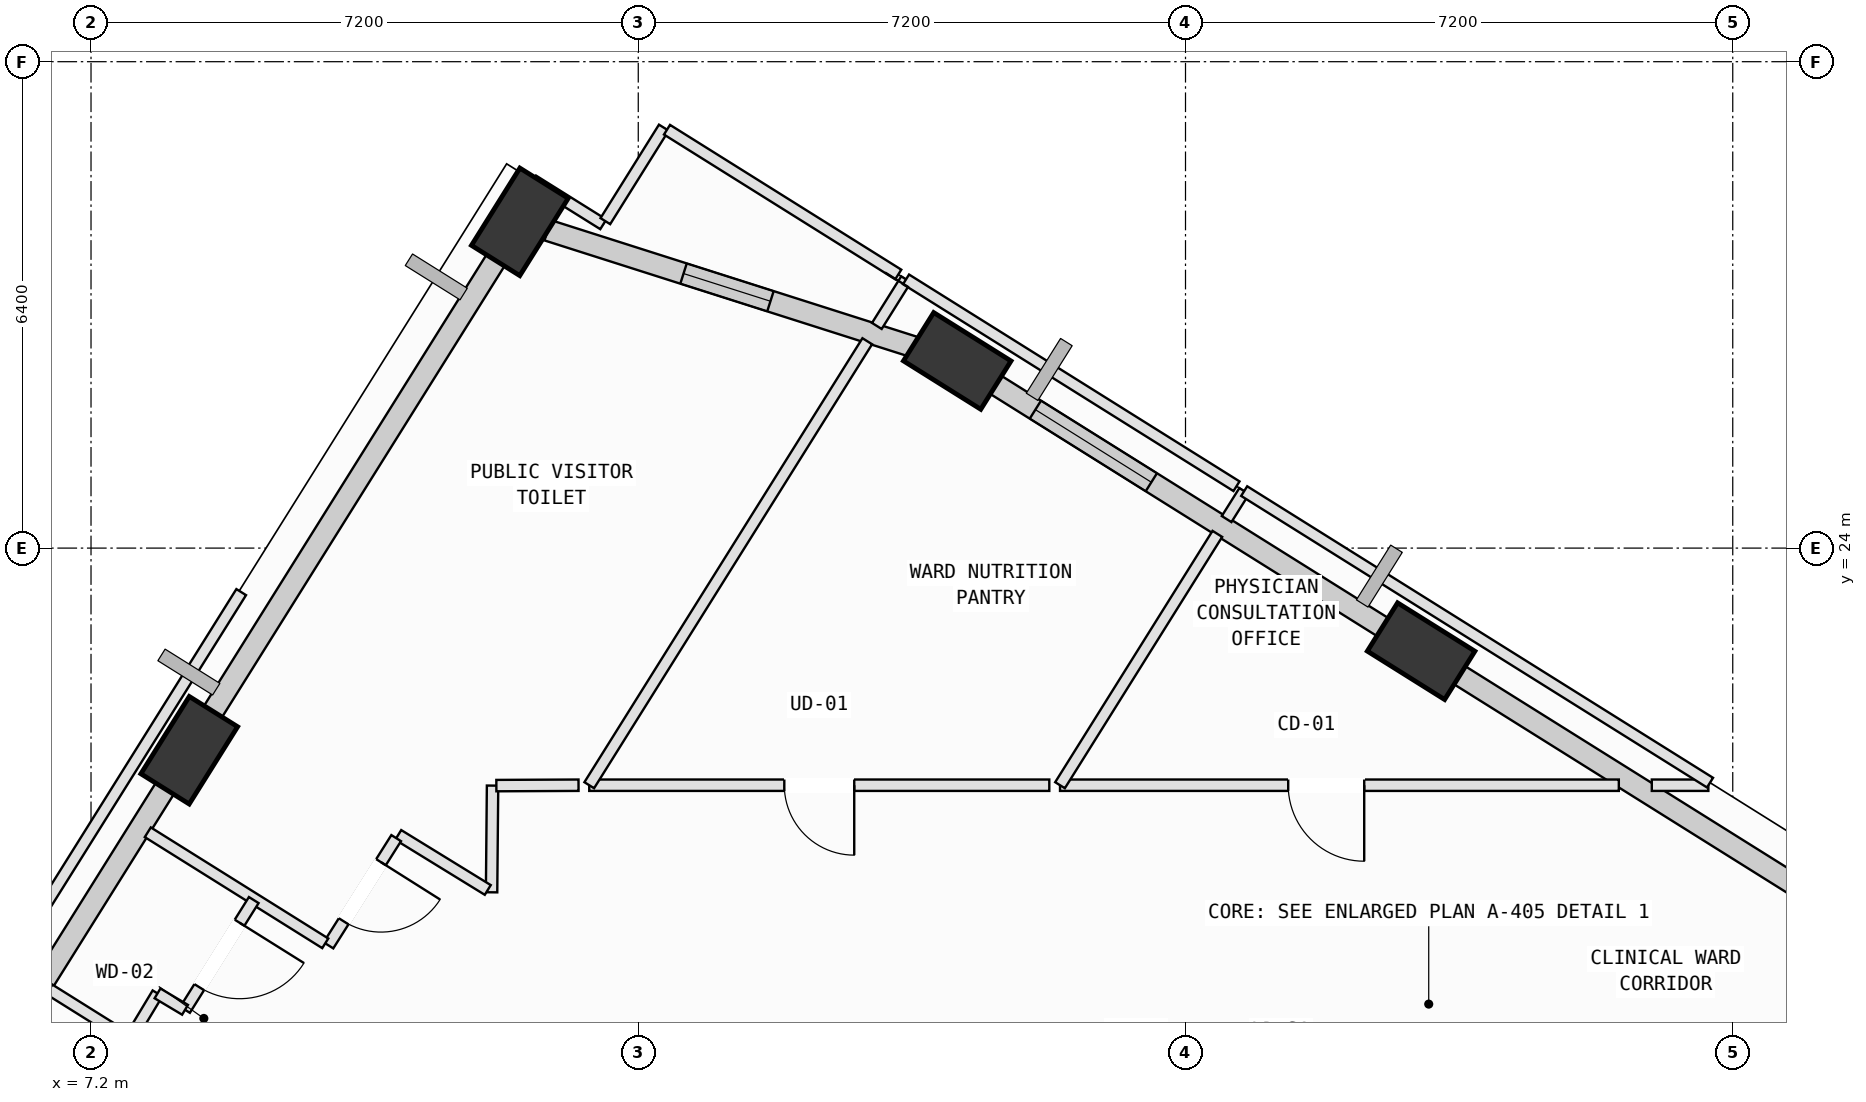
"""IFC4 building model, lengths in metres.
Left out: names, types, materials, properties, quantities, classifications, styles, units other than length and angle.
Written with IfcOpenShell. Run it as: python <this file> out.ifc"""

import sys

from ifc_helpers import new_model, si_unit, direction, frame, frame_2d, origin, origin_2d, place, context, subcontext, project, spatial, rectangle, extrude, element, fill, save


model = new_model("IFC4")
c1 = context("Model", 3, precision=1e-05, world=origin(), true_north=direction((0.0, 1.0)))
c2 = subcontext(c1, "Body", "Model", "MODEL_VIEW")
j1 = project(units=[si_unit("LENGTHUNIT", "METRE"), si_unit("PLANEANGLEUNIT", "RADIAN")], contexts=[c1])
p1 = place(None, origin())
s1 = spatial("IfcSite", under=j1, at=p1, CompositionType="ELEMENT")
p2 = place(p1, origin())
s2 = spatial("IfcBuilding", under=s1, at=p2, CompositionType="ELEMENT")
p3 = place(p2, frame((0.0, 0.0, 272.6)))
s3 = spatial("IfcBuildingStorey", under=s2, at=p3, CompositionType="ELEMENT", Elevation=272.6)
p4 = place(p3, frame((24.7, 22.644, 0.027), z_axis=(0.009214486038, -0.036796514246, 0.999280295906), x_axis=(-0.951010910613, 0.308501309069, 0.020129336738)))
e1 = element("IfcColumn", 1, at=p4, inside=s3, PredefinedType="COLUMN", context=c2, shape_type="SweptSolid", body=[
    extrude(rectangle(XDim=1.2, YDim=0.75, at=origin_2d()), origin(), (0.0, 0.0, 1.0), 3.974),
])
p5 = place(p3, frame((18.597, 26.463, 0.042), z_axis=(-0.006344430074, -0.062150776165, 0.998046606742), x_axis=(-0.789418350055, 0.612959701382, 0.0331522711)))
e2 = element("IfcColumn", 2, at=p5, inside=s3, PredefinedType="COLUMN", context=c2, shape_type="SweptSolid", body=[
    extrude(rectangle(XDim=1.2, YDim=0.75, at=origin_2d()), origin(), (0.0, 0.0, 1.0), 3.964),
])
p6 = place(p3, frame((12.842, 28.293, 0.064), z_axis=(-0.013724721487, -0.085810420826, 0.996216946101), x_axis=(0.657356075129, 0.749971848322, 0.073656073858)))
e3 = element("IfcColumn", 3, at=p6, inside=s3, PredefinedType="COLUMN", context=c2, shape_type="SweptSolid", body=[
    extrude(rectangle(XDim=1.2, YDim=0.75, at=origin_2d()), origin(), (0.0, 0.0, 1.0), 3.949),
])
p7 = place(p3, frame((8.492, 21.34, 0.076), z_axis=(0.015107029766, -0.103396474218, 0.994525488246), x_axis=(0.403217157116, 0.910808249086, 0.088567813586)))
e4 = element("IfcColumn", 4, at=p7, inside=s3, PredefinedType="COLUMN", context=c2, shape_type="SweptSolid", body=[
    extrude(rectangle(XDim=1.2, YDim=0.75, at=origin_2d()), origin(), (0.0, 0.0, 1.0), 3.943),
])
p8 = place(p3, frame((25.08, 22.406, 0.0), z_axis=(0.0, 0.0, 1.0), x_axis=(0.847580141129, -0.530667414077, 0.0)))
e5 = element("IfcWall", 5, at=p8, inside=s3, PredefinedType="SOLIDWALL", context=c2, shape_type="SweptSolid", body=[
    extrude(rectangle(XDim=6.958, YDim=0.28, at=frame_2d((3.479, 0.0))), origin(), (0.0, 0.0, 1.0), 2.765),
])
p9 = place(p3, frame((18.967, 26.234, 0.0), z_axis=(0.0, 0.0, 1.0), x_axis=(0.847594536736, -0.530644420771, 0.0)))
e6 = element("IfcWall", 6, at=p9, inside=s3, PredefinedType="SOLIDWALL", context=c2, shape_type="SweptSolid", body=[
    extrude(rectangle(XDim=6.424, YDim=0.28, at=frame_2d((3.212, 0.0))), origin(), (0.0, 0.0, 1.0), 3.265),
])
p10 = place(p9, frame((0.776, 0.0, 0.75)))
e7 = element("IfcOpeningElement", 7, at=p10, cuts=e6, PredefinedType="OPENING", context=c2, shape_type="SweptSolid", body=[
    extrude(rectangle(XDim=1.8, YDim=2.05, at=frame_2d((0.9, 1.025))), frame((0.0, 0.15, 0.0), z_axis=(0.0, -1.0, 0.0), x_axis=(1.0, 0.0, 0.0)), (0.0, 0.0, 1.0), 0.3),
])
p11 = place(p3, frame((13.209, 28.182, 0.0), z_axis=(0.0, 0.0, 1.0), x_axis=(0.952825347656, -0.303519121086, 0.0)))
e8 = element("IfcWall", 8, at=p11, inside=s3, PredefinedType="SOLIDWALL", context=c2, shape_type="SweptSolid", body=[
    extrude(rectangle(XDim=5.302, YDim=0.28, at=frame_2d((2.651, 0.0))), origin(), (0.0, 0.0, 1.0), 3.265),
])
p12 = place(p11, frame((1.875, 0.0, 0.75)))
e9 = element("IfcOpeningElement", 9, at=p12, cuts=e8, PredefinedType="OPENING", context=c2, shape_type="SweptSolid", body=[
    extrude(rectangle(XDim=1.2, YDim=1.75, at=frame_2d((0.6, 0.875))), frame((0.0, 0.15, 0.0), z_axis=(0.0, -1.0, 0.0), x_axis=(1.0, 0.0, 0.0)), (0.0, 0.0, 1.0), 0.3),
])
p13 = place(p3, frame((8.604, 21.529, 0.0), z_axis=(0.0, 0.0, 1.0), x_axis=(0.530668867354, 0.847579231235, 0.0)))
e10 = element("IfcWall", 10, at=p13, inside=s3, PredefinedType="SOLIDWALL", context=c2, shape_type="SweptSolid", body=[
    extrude(rectangle(XDim=7.434, YDim=0.28, at=frame_2d((3.717, 0.0))), origin(), (0.0, 0.0, 1.0), 3.265),
])
p14 = place(p3, frame((4.236, 14.552, 0.0), z_axis=(0.0, 0.0, 1.0), x_axis=(0.530664333184, 0.847582070059, 0.0)))
e11 = element("IfcWall", 11, at=p14, inside=s3, PredefinedType="SOLIDWALL", context=c2, shape_type="SweptSolid", body=[
    extrude(rectangle(XDim=7.485, YDim=0.28, at=frame_2d((3.742, 0.0))), origin(), (0.0, 0.0, 1.0), 3.265),
])
p15 = place(p3, frame((6.652, 18.193, 0.0), z_axis=(0.0, 0.0, 1.0), x_axis=(0.847575288096, -0.530675165246, 0.0)))
e12 = element("IfcWall", 12, at=p15, inside=s3, PredefinedType="PARTITIONING", context=c2, shape_type="SweptSolid", body=[
    extrude(rectangle(XDim=2.855, YDim=0.15, at=frame_2d((1.428, 0.0))), origin(), (0.0, 0.0, 1.0), 3.78),
])
p16 = place(p15, frame((1.275, 0.0, 0.0)))
e13 = element("IfcOpeningElement", 13, at=p16, cuts=e12, PredefinedType="OPENING", context=c2, shape_type="SweptSolid", body=[
    extrude(rectangle(XDim=1.3, YDim=2.15, at=frame_2d((0.65, 1.075))), frame((0.0, 0.085, 0.0), z_axis=(0.0, -1.0, 0.0), x_axis=(1.0, 0.0, 0.0)), (0.0, 0.0, 1.0), 0.17),
])
p17 = place(p3, frame((28.479, 20.88, 0.0), z_axis=(0.0, 0.0, 1.0), x_axis=(-1.0, 0.0, 0.0)))
e14 = element("IfcWall", 14, at=p17, inside=s3, PredefinedType="PARTITIONING", context=c2, shape_type="SweptSolid", body=[
    extrude(rectangle(XDim=0.744, YDim=0.15, at=frame_2d((0.372, 0.0))), origin(), (0.0, 0.0, 1.0), 3.78),
])
p18 = place(p3, frame((27.301, 20.88, 0.0), z_axis=(0.0, 0.0, 1.0), x_axis=(-1.0, 0.0, 0.0)))
e15 = element("IfcWall", 15, at=p18, inside=s3, PredefinedType="PARTITIONING", context=c2, shape_type="SweptSolid", body=[
    extrude(rectangle(XDim=7.352, YDim=0.15, at=frame_2d((3.676, 0.0))), origin(), (0.0, 0.0, 1.0), 3.415),
])
p19 = place(p18, frame((3.35, 0.0, 0.0)))
e16 = element("IfcOpeningElement", 16, at=p19, cuts=e15, PredefinedType="OPENING", context=c2, shape_type="SweptSolid", body=[
    extrude(rectangle(XDim=1.0, YDim=2.12, at=frame_2d((0.5, 1.06))), frame((0.0, 0.085, 0.0), z_axis=(0.0, -1.0, 0.0), x_axis=(1.0, 0.0, 0.0)), (0.0, 0.0, 1.0), 0.17),
])
p20 = place(p3, frame((19.949, 20.88, 0.0), z_axis=(0.0, 0.0, 1.0), x_axis=(0.530572539095, 0.847639534683, 0.0)))
e17 = element("IfcWall", 17, at=p20, inside=s3, PredefinedType="PARTITIONING", context=c2, shape_type="SweptSolid", body=[
    extrude(rectangle(XDim=3.902, YDim=0.15, at=frame_2d((1.951, 0.0))), origin(), (0.0, 0.0, 1.0), 3.78),
])
p21 = place(p3, frame((22.141, 24.382, 0.0), z_axis=(0.0, 0.0, 1.0), x_axis=(0.531665012804, 0.846954729699, 0.0)))
e18 = element("IfcWall", 18, at=p21, inside=s3, PredefinedType="PARTITIONING", context=c2, shape_type="SweptSolid", body=[
    extrude(rectangle(XDim=0.434, YDim=0.15, at=frame_2d((0.217, 0.0))), origin(), (0.0, 0.0, 1.0), 3.78),
])
p22 = place(p3, frame((22.372, 24.75, 0.0), z_axis=(0.0, 0.0, 1.0), x_axis=(0.847664268659, -0.530533022194, 0.0)))
e19 = element("IfcWall", 19, at=p22, inside=s3, PredefinedType="PARTITIONING", context=c2, shape_type="SweptSolid", body=[
    extrude(rectangle(XDim=7.23, YDim=0.15, at=frame_2d((3.615, 0.0))), origin(), (0.0, 0.0, 1.0), 3.78),
])
p23 = place(p3, frame((19.808, 20.88, 0.0), z_axis=(0.0, 0.0, 1.0), x_axis=(-1.0, 0.0, 0.0)))
e20 = element("IfcWall", 20, at=p23, inside=s3, PredefinedType="PARTITIONING", context=c2, shape_type="SweptSolid", body=[
    extrude(rectangle(XDim=6.053, YDim=0.15, at=frame_2d((3.027, 0.0))), origin(), (0.0, 0.0, 1.0), 3.415),
])
p24 = place(p23, frame((2.566, 0.0, 0.0)))
e21 = element("IfcOpeningElement", 21, at=p24, cuts=e20, PredefinedType="OPENING", context=c2, shape_type="SweptSolid", body=[
    extrude(rectangle(XDim=0.92, YDim=2.1, at=frame_2d((0.46, 1.05))), frame((0.0, 0.085, 0.0), z_axis=(0.0, -1.0, 0.0), x_axis=(1.0, 0.0, 0.0)), (0.0, 0.0, 1.0), 0.17),
])
p25 = place(p3, frame((13.755, 20.88, 0.0), z_axis=(0.0, 0.0, 1.0), x_axis=(0.530721458617, 0.847546301605, 0.0)))
e22 = element("IfcWall", 22, at=p25, inside=s3, PredefinedType="PARTITIONING", context=c2, shape_type="SweptSolid", body=[
    extrude(rectangle(XDim=6.893, YDim=0.15, at=frame_2d((3.446, 0.0))), origin(), (0.0, 0.0, 1.0), 3.78),
])
p26 = place(p3, frame((17.539, 26.923, 0.0), z_axis=(0.0, 0.0, 1.0), x_axis=(0.531030285818, 0.847352840052, 0.0)))
e23 = element("IfcWall", 23, at=p26, inside=s3, PredefinedType="PARTITIONING", context=c2, shape_type="SweptSolid", body=[
    extrude(rectangle(XDim=0.723, YDim=0.15, at=frame_2d((0.362, 0.0))), origin(), (0.0, 0.0, 1.0), 3.78),
])
p27 = place(p3, frame((17.923, 27.536, 0.0), z_axis=(0.0, 0.0, 1.0), x_axis=(0.847605017628, -0.530627679349, 0.0)))
e24 = element("IfcWall", 24, at=p27, inside=s3, PredefinedType="PARTITIONING", context=c2, shape_type="SweptSolid", body=[
    extrude(rectangle(XDim=5.13, YDim=0.15, at=frame_2d((2.565, 0.0))), origin(), (0.0, 0.0, 1.0), 3.78),
])
p28 = place(p3, frame((12.483, 20.875, 0.0), z_axis=(0.0, 0.0, 1.0), x_axis=(-0.009215397231, -0.999957537325, 0.0)))
e25 = element("IfcWall", 25, at=p28, inside=s3, PredefinedType="PARTITIONING", context=c2, shape_type="SweptSolid", body=[
    extrude(rectangle(XDim=1.404, YDim=0.15, at=frame_2d((0.702, 0.0))), origin(), (0.0, 0.0, 1.0), 3.78),
])
p29 = place(p3, frame((12.42, 19.502, 0.0), z_axis=(0.0, 0.0, 1.0), x_axis=(-0.851912829568, 0.523683617098, 0.0)))
e26 = element("IfcWall", 26, at=p29, inside=s3, PredefinedType="PARTITIONING", context=c2, shape_type="SweptSolid", body=[
    extrude(rectangle(XDim=1.383, YDim=0.15, at=frame_2d((0.691, 0.0))), origin(), (0.0, 0.0, 1.0), 3.78),
])
p30 = place(p3, frame((11.215, 20.184, 0.0), z_axis=(0.0, 0.0, 1.0), x_axis=(-0.533937952573, -0.845523661882, 0.0)))
e27 = element("IfcWall", 27, at=p30, inside=s3, PredefinedType="PARTITIONING", context=c2, shape_type="SweptSolid", body=[
    extrude(rectangle(XDim=1.669, YDim=0.15, at=frame_2d((0.834, 0.0))), origin(), (0.0, 0.0, 1.0), 3.78),
])
p31 = place(p30, frame((0.375, 0.0, 0.0)))
e28 = element("IfcOpeningElement", 28, at=p31, cuts=e27, PredefinedType="OPENING", context=c2, shape_type="SweptSolid", body=[
    extrude(rectangle(XDim=0.92, YDim=2.1, at=frame_2d((0.46, 1.05))), frame((0.0, 0.085, 0.0), z_axis=(0.0, -1.0, 0.0), x_axis=(1.0, 0.0, 0.0)), (0.0, 0.0, 1.0), 0.17),
])
p32 = place(p3, frame((10.282, 18.8, 0.0), z_axis=(0.0, 0.0, 1.0), x_axis=(-0.847739258665, 0.530413187354, 0.0)))
e29 = element("IfcWall", 29, at=p32, inside=s3, PredefinedType="PARTITIONING", context=c2, shape_type="SweptSolid", body=[
    extrude(rectangle(XDim=2.754, YDim=0.15, at=frame_2d((1.377, 0.0))), origin(), (0.0, 0.0, 1.0), 3.78),
])
p33 = place(p3, frame((8.047, 20.997, 0.0), z_axis=(0.0, 0.0, 1.0), x_axis=(0.531408304338, 0.847115820937, 0.0)))
e30 = element("IfcWall", 30, at=p33, inside=s3, PredefinedType="PARTITIONING", context=c2, shape_type="SweptSolid", body=[
    extrude(rectangle(XDim=0.747, YDim=0.15, at=frame_2d((0.374, 0.0))), origin(), (0.0, 0.0, 1.0), 3.78),
])
p34 = place(p3, frame((12.388, 27.931, 0.0), z_axis=(0.0, 0.0, 1.0), x_axis=(0.530755372275, 0.847525064409, 0.0)))
e31 = element("IfcWall", 31, at=p34, inside=s3, PredefinedType="PARTITIONING", context=c2, shape_type="SweptSolid", body=[
    extrude(rectangle(XDim=1.102, YDim=0.15, at=frame_2d((0.551, 0.0))), origin(), (0.0, 0.0, 1.0), 3.265),
])
p35 = place(p3, frame((13.015, 28.838, 0.0), z_axis=(0.0, 0.0, 1.0), x_axis=(0.848111459757, -0.529817847782, 0.0)))
e32 = element("IfcWall", 32, at=p35, inside=s3, PredefinedType="PARTITIONING", context=c2, shape_type="SweptSolid", body=[
    extrude(rectangle(XDim=1.091, YDim=0.15, at=frame_2d((0.545, 0.0))), origin(), (0.0, 0.0, 1.0), 3.78),
])
p36 = place(p3, frame((13.967, 28.302, 0.0), z_axis=(0.0, 0.0, 1.0), x_axis=(0.530150213956, 0.847903739019, 0.0)))
e33 = element("IfcWall", 33, at=p36, inside=s3, PredefinedType="PARTITIONING", context=c2, shape_type="SweptSolid", body=[
    extrude(rectangle(XDim=1.451, YDim=0.15, at=frame_2d((0.725, 0.0))), origin(), (0.0, 0.0, 1.0), 3.78),
])
p37 = place(p3, frame((14.778, 29.505, 0.0), z_axis=(0.0, 0.0, 1.0), x_axis=(0.847631325051, -0.530585654529, 0.0)))
e34 = element("IfcWall", 34, at=p37, inside=s3, PredefinedType="PARTITIONING", context=c2, shape_type="SweptSolid", body=[
    extrude(rectangle(XDim=3.59, YDim=0.15, at=frame_2d((1.795, 0.0))), origin(), (0.0, 0.0, 1.0), 3.78),
])
p38 = place(p3, frame((13.614, 20.88, 0.0), z_axis=(0.0, 0.0, 1.0), x_axis=(-0.999989799813, -0.004516665762, 0.0)))
e35 = element("IfcWall", 35, at=p38, inside=s3, PredefinedType="PARTITIONING", context=c2, shape_type="SweptSolid", body=[
    extrude(rectangle(XDim=1.081, YDim=0.15, at=frame_2d((0.541, 0.0))), origin(), (0.0, 0.0, 1.0), 3.78),
])
p39 = place(p3, frame((8.075, 18.141, 0.0), z_axis=(0.0, 0.0, 1.0), x_axis=(-0.515577678188, -0.85684284309, 0.0)))
e36 = element("IfcWall", 36, at=p39, inside=s3, PredefinedType="PARTITIONING", context=c2, shape_type="SweptSolid", body=[
    extrude(rectangle(XDim=0.63, YDim=0.15, at=frame_2d((0.315, 0.0))), origin(), (0.0, 0.0, 1.0), 3.78),
])
p40 = place(p3, frame((5.891, 18.174, 0.0), z_axis=(0.0, 0.0, 1.0), x_axis=(0.530654624603, 0.847588148447, 0.0)))
e37 = element("IfcWall", 37, at=p40, inside=s3, PredefinedType="PARTITIONING", context=c2, shape_type="SweptSolid", body=[
    extrude(rectangle(XDim=6.19, YDim=0.15, at=frame_2d((3.095, 0.0))), origin(), (0.0, 0.0, 1.0), 3.78),
])
p41 = place(p3, frame((9.341, 19.369, 0.0), z_axis=(0.0, 0.0, 1.0), x_axis=(-0.530694401654, -0.847563243689, 0.0)))
e38 = element("IfcWall", 38, at=p41, inside=s3, PredefinedType="PARTITIONING", context=c2, shape_type="SweptSolid", body=[
    extrude(rectangle(XDim=1.704, YDim=0.15, at=frame_2d((0.852, 0.0))), origin(), (0.0, 0.0, 1.0), 3.78),
])
p42 = place(p41, frame((0.352, 0.0, 0.0)))
e39 = element("IfcOpeningElement", 39, at=p42, cuts=e38, PredefinedType="OPENING", context=c2, shape_type="SweptSolid", body=[
    extrude(rectangle(XDim=1.0, YDim=2.12, at=frame_2d((0.5, 1.06))), frame((0.0, 0.085, 0.0), z_axis=(0.0, -1.0, 0.0), x_axis=(1.0, 0.0, 0.0)), (0.0, 0.0, 1.0), 0.17),
])
p43 = place(p3, frame((8.437, 17.925, 0.0), z_axis=(0.0, 0.0, 1.0), x_axis=(-0.858716693244, 0.512450622738, 0.0)))
e40 = element("IfcWall", 40, at=p43, inside=s3, PredefinedType="PARTITIONING", context=c2, shape_type="SweptSolid", body=[
    extrude(rectangle(XDim=0.422, YDim=0.15, at=frame_2d((0.211, 0.0))), origin(), (0.0, 0.0, 1.0), 3.78),
])
p44 = place(p10, origin())
e41 = element("IfcWindow", 41, at=p44, inside=s3, PartitioningType="SINGLE_PANEL", PredefinedType="WINDOW", context=c2, shape_type="SweptSolid", body=[
    extrude(rectangle(XDim=1.8, YDim=2.05, at=frame_2d((0.9, 1.025))), frame((0.0, 0.03, 0.0), z_axis=(0.0, -1.0, 0.0), x_axis=(1.0, 0.0, 0.0)), (0.0, 0.0, 1.0), 0.06),
])
fill(e7, e41)
p45 = place(p12, origin())
e42 = element("IfcWindow", 42, at=p45, inside=s3, PartitioningType="SINGLE_PANEL", PredefinedType="WINDOW", context=c2, shape_type="SweptSolid", body=[
    extrude(rectangle(XDim=1.2, YDim=1.75, at=frame_2d((0.6, 0.875))), frame((0.0, 0.03, 0.0), z_axis=(0.0, -1.0, 0.0), x_axis=(1.0, 0.0, 0.0)), (0.0, 0.0, 1.0), 0.06),
])
fill(e9, e42)
p46 = place(p19, origin())
e43 = element("IfcDoor", 43, at=p46, inside=s3, OperationType="SINGLE_SWING_LEFT", PredefinedType="DOOR", context=c2, shape_type="SweptSolid", body=[
    extrude(rectangle(XDim=1.0, YDim=2.12, at=frame_2d((0.5, 1.06))), frame((0.0, 0.025, 0.0), z_axis=(0.0, -1.0, 0.0), x_axis=(1.0, 0.0, 0.0)), (0.0, 0.0, 1.0), 0.05),
])
fill(e16, e43)
p47 = place(p24, origin())
e44 = element("IfcDoor", 44, at=p47, inside=s3, OperationType="SINGLE_SWING_LEFT", PredefinedType="DOOR", context=c2, shape_type="SweptSolid", body=[
    extrude(rectangle(XDim=0.92, YDim=2.1, at=frame_2d((0.46, 1.05))), frame((0.0, 0.025, 0.0), z_axis=(0.0, -1.0, 0.0), x_axis=(1.0, 0.0, 0.0)), (0.0, 0.0, 1.0), 0.05),
])
fill(e21, e44)
p48 = place(p31, origin())
e45 = element("IfcDoor", 45, at=p48, inside=s3, OperationType="SINGLE_SWING_LEFT", PredefinedType="DOOR", context=c2, shape_type="SweptSolid", body=[
    extrude(rectangle(XDim=0.92, YDim=2.1, at=frame_2d((0.46, 1.05))), frame((0.0, 0.025, 0.0), z_axis=(0.0, -1.0, 0.0), x_axis=(1.0, 0.0, 0.0)), (0.0, 0.0, 1.0), 0.05),
])
fill(e28, e45)
p49 = place(p42, origin())
e46 = element("IfcDoor", 46, at=p49, inside=s3, OperationType="SINGLE_SWING_LEFT", PredefinedType="DOOR", context=c2, shape_type="SweptSolid", body=[
    extrude(rectangle(XDim=1.0, YDim=2.12, at=frame_2d((0.5, 1.06))), frame((0.0, 0.025, 0.0), z_axis=(0.0, -1.0, 0.0), x_axis=(1.0, 0.0, 0.0)), (0.0, 0.0, 1.0), 0.05),
])
fill(e39, e46)
save(model, sys.argv[1])
